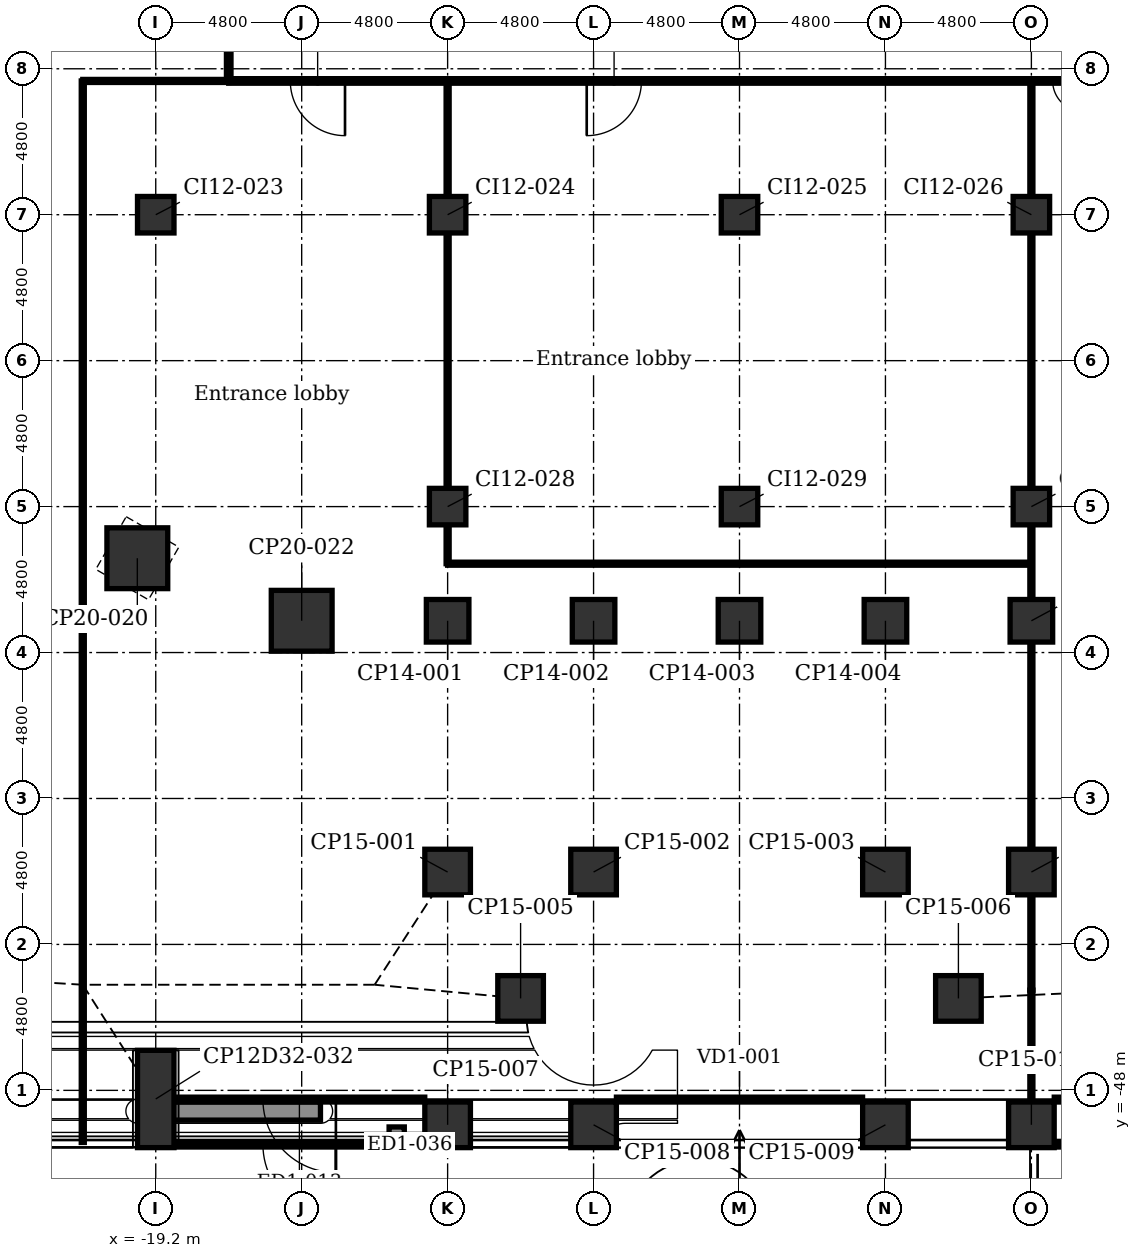
"""IFC4 building model, lengths in metres.
Left out: names, types, materials, properties, quantities, classifications, styles, units other than length and angle.
Written with IfcOpenShell. Run it as: python <this file> out.ifc"""

import sys

from ifc_helpers import new_model, si_unit, direction, frame, frame_2d, origin, origin_2d, place, context, subcontext, project, spatial, rectangle, extrude, element, fill, save


model = new_model("IFC4")
c1 = context("Model", 3, precision=1e-05, world=origin(), true_north=direction((0.0, 1.0)))
c2 = subcontext(c1, "Body", "Model", "MODEL_VIEW")
j1 = project(units=[si_unit("LENGTHUNIT", "METRE"), si_unit("PLANEANGLEUNIT", "RADIAN")], contexts=[c1])
p1 = place(None, origin())
s1 = spatial("IfcSite", under=j1, at=p1, CompositionType="ELEMENT")
p2 = place(p1, origin())
s2 = spatial("IfcBuilding", under=s1, at=p2, CompositionType="ELEMENT")
p3 = place(p2, origin())
s3 = spatial("IfcBuildingStorey", under=s2, at=p3, CompositionType="ELEMENT", Elevation=0.0)
for number, where, z_axis, x_axis in (
    (1, (9.6, -49.133, -0.4), (0.0, 0.0, 1.0), (1.0, 0.0, 0.0)),
    (2, (4.8, -49.133, -0.4), (0.0, 0.0, 1.0), (1.0, 0.0, 0.0)),
    (3, (-4.8, -49.133, -0.4), (0.0, 0.0, 1.0), (1.0, 0.0, 0.0)),
    (4, (-9.6, -49.133, -0.4), (0.0, 0.0, 1.0), (1.0, 0.0, 0.0)),
):
    element("IfcColumn", number, at=place(p3, frame(where, z_axis=z_axis, x_axis=x_axis)), inside=s3, PredefinedType="COLUMN", context=c2, shape_type="SweptSolid", body=[
        extrude(rectangle(XDim=1.5, YDim=1.5, at=origin_2d()), origin(), (0.0, 0.0, 1.0), 7.1),
    ])
p4 = place(p3, frame((-19.2, -48.283, -0.4), z_axis=(0.0, 0.0, 1.0), x_axis=(1.0, 0.0, 0.0)))
e5 = element("IfcColumn", 5, at=p4, inside=s3, PredefinedType="COLUMN", context=c2, shape_type="SweptSolid", body=[
    extrude(rectangle(XDim=1.2, YDim=3.2, at=origin_2d()), origin(), (0.0, 0.0, 1.0), 7.1),
])
for number, where, z_axis, x_axis in (
    (6, (7.2, -44.976, -0.4), (0.0, 0.0, 1.0), (1.0, 0.0, 0.0)),
    (7, (-7.2, -44.976, -0.4), (0.0, 0.0, 1.0), (1.0, 0.0, 0.0)),
    (8, (9.6, -40.819, -0.4), (0.0, 0.0, 1.0), (1.0, 0.0, 0.0)),
    (9, (4.8, -40.819, -0.4), (0.0, 0.0, 1.0), (1.0, 0.0, 0.0)),
    (10, (-4.8, -40.819, -0.4), (0.0, 0.0, 1.0), (1.0, 0.0, 0.0)),
    (11, (-9.6, -40.819, -0.4), (0.0, 0.0, 1.0), (1.0, 0.0, 0.0)),
):
    element("IfcColumn", number, at=place(p3, frame(where, z_axis=z_axis, x_axis=x_axis)), inside=s3, PredefinedType="COLUMN", context=c2, shape_type="SweptSolid", body=[
        extrude(rectangle(XDim=1.5, YDim=1.5, at=origin_2d()), origin(), (0.0, 0.0, 1.0), 7.1),
    ])
for number, where, z_axis, x_axis in (
    (12, (-14.4, -32.555, -0.4), (0.0, 0.0, 1.0), (1.0, 0.0, 0.0)),
    (13, (-19.806, -30.498, -0.4), (0.0, 0.0, 1.0), (0.5, 0.866, 0.0)),
):
    element("IfcColumn", number, at=place(p3, frame(where, z_axis=z_axis, x_axis=x_axis)), inside=s3, PredefinedType="COLUMN", context=c2, shape_type="SweptSolid", body=[
        extrude(rectangle(XDim=2.0, YDim=2.0, at=origin_2d()), origin(), (0.0, 0.0, 1.0), 7.1),
    ])
for number, where, z_axis, x_axis in (
    (14, (9.6, -32.555, -0.4), (0.0, 0.0, 1.0), (1.0, 0.0, 0.0)),
    (15, (4.8, -32.555, -0.4), (0.0, 0.0, 1.0), (1.0, 0.0, 0.0)),
    (16, (0.0, -32.555, -0.4), (0.0, 0.0, 1.0), (1.0, 0.0, 0.0)),
    (17, (-4.8, -32.555, -0.4), (0.0, 0.0, 1.0), (1.0, 0.0, 0.0)),
    (18, (-9.6, -32.555, -0.4), (0.0, 0.0, 1.0), (1.0, 0.0, 0.0)),
):
    element("IfcColumn", number, at=place(p3, frame(where, z_axis=z_axis, x_axis=x_axis)), inside=s3, PredefinedType="COLUMN", context=c2, shape_type="SweptSolid", body=[
        extrude(rectangle(XDim=1.4, YDim=1.4, at=origin_2d()), origin(), (0.0, 0.0, 1.0), 7.1),
    ])
for number, where, z_axis, x_axis in (
    (19, (-19.2, -19.2, -0.4), (0.0, 0.0, 1.0), (1.0, 0.0, 0.0)),
    (20, (-9.6, -28.8, -0.4), (0.0, 0.0, 1.0), (1.0, 0.0, 0.0)),
    (21, (-9.6, -19.2, -0.4), (0.0, 0.0, 1.0), (1.0, 0.0, 0.0)),
    (22, (0.0, -28.8, -0.4), (0.0, 0.0, 1.0), (1.0, 0.0, 0.0)),
    (23, (0.0, -19.2, -0.4), (0.0, 0.0, 1.0), (1.0, 0.0, 0.0)),
    (24, (9.6, -28.8, -0.4), (0.0, 0.0, 1.0), (1.0, 0.0, 0.0)),
    (25, (9.6, -19.2, -0.4), (0.0, 0.0, 1.0), (1.0, 0.0, 0.0)),
):
    element("IfcColumn", number, at=place(p3, frame(where, z_axis=z_axis, x_axis=x_axis)), inside=s3, PredefinedType="COLUMN", context=c2, shape_type="SweptSolid", body=[
        extrude(rectangle(XDim=1.2, YDim=1.2, at=origin_2d()), origin(), (0.0, 0.0, 1.0), 7.1),
    ])
p5 = place(p3, frame((18.598, -48.303, 0.0), z_axis=(0.0, 0.0, 1.0), x_axis=(-1.0, 0.0, 0.0)))
e26 = element("IfcWall", 26, at=p5, inside=s3, PredefinedType="PARTITIONING", context=c2, shape_type="SweptSolid", body=[
    extrude(rectangle(XDim=8.246, YDim=0.16, at=frame_2d((4.123, 0.0))), origin(), (0.0, 0.0, 1.0), 6.7),
])
p6 = place(p5, frame((2.923, 0.0, 0.0)))
e27 = element("IfcOpeningElement", 27, at=p6, cuts=e26, PredefinedType="OPENING", context=c2, shape_type="SweptSolid", body=[
    extrude(rectangle(XDim=2.4, YDim=2.4, at=frame_2d((1.2, 1.2))), frame((0.0, 0.09, 0.0), z_axis=(0.0, -1.0, 0.0), x_axis=(1.0, 0.0, 0.0)), (0.0, 0.0, 1.0), 0.18),
])
p7 = place(p3, frame((4.048, -48.303, 0.0), z_axis=(0.0, 0.0, 1.0), x_axis=(-1.0, 0.0, 0.0)))
e28 = element("IfcWall", 28, at=p7, inside=s3, PredefinedType="PARTITIONING", context=c2, shape_type="SweptSolid", body=[
    extrude(rectangle(XDim=8.096, YDim=0.16, at=frame_2d((4.048, 0.0))), origin(), (0.0, 0.0, 1.0), 6.7),
])
p8 = place(p7, frame((1.298, 0.0, 0.0)))
e29 = element("IfcOpeningElement", 29, at=p8, cuts=e28, PredefinedType="OPENING", context=c2, shape_type="SweptSolid", body=[
    extrude(rectangle(XDim=5.5, YDim=4.5, at=frame_2d((2.75, 2.25))), frame((0.0, 0.09, 0.0), z_axis=(0.0, -1.0, 0.0), x_axis=(1.0, 0.0, 0.0)), (0.0, 0.0, 1.0), 0.18),
])
p9 = place(p3, frame((-10.352, -48.303, 0.0), z_axis=(0.0, 0.0, 1.0), x_axis=(-1.0, 0.0, 0.0)))
e30 = element("IfcWall", 30, at=p9, inside=s3, PredefinedType="PARTITIONING", context=c2, shape_type="SweptSolid", body=[
    extrude(rectangle(XDim=8.246, YDim=0.16, at=frame_2d((4.123, 0.0))), origin(), (0.0, 0.0, 1.0), 6.7),
])
p10 = place(p9, frame((2.923, 0.0, 0.0)))
e31 = element("IfcOpeningElement", 31, at=p10, cuts=e30, PredefinedType="OPENING", context=c2, shape_type="SweptSolid", body=[
    extrude(rectangle(XDim=2.4, YDim=2.4, at=frame_2d((1.2, 1.2))), frame((0.0, 0.09, 0.0), z_axis=(0.0, -1.0, 0.0), x_axis=(1.0, 0.0, 0.0)), (0.0, 0.0, 1.0), 0.18),
])
p11 = place(p3, frame((18.596, -49.783, 0.0), z_axis=(0.0, 0.0, 1.0), x_axis=(-1.0, 0.0, 0.0)))
e32 = element("IfcWall", 32, at=p11, inside=s3, PredefinedType="PARTITIONING", context=c2, shape_type="SweptSolid", body=[
    extrude(rectangle(XDim=8.242, YDim=0.16, at=frame_2d((4.121, 0.0))), origin(), (0.0, 0.0, 1.0), 6.7),
])
p12 = place(p11, frame((2.921, 0.0, 0.0)))
e33 = element("IfcOpeningElement", 33, at=p12, cuts=e32, PredefinedType="OPENING", context=c2, shape_type="SweptSolid", body=[
    extrude(rectangle(XDim=2.4, YDim=2.4, at=frame_2d((1.2, 1.2))), frame((0.0, 0.09, 0.0), z_axis=(0.0, -1.0, 0.0), x_axis=(1.0, 0.0, 0.0)), (0.0, 0.0, 1.0), 0.18),
])
p13 = place(p3, frame((-10.354, -49.783, 0.0), z_axis=(0.0, 0.0, 1.0), x_axis=(-1.0, 0.0, 0.0)))
e34 = element("IfcWall", 34, at=p13, inside=s3, PredefinedType="PARTITIONING", context=c2, shape_type="SweptSolid", body=[
    extrude(rectangle(XDim=8.242, YDim=0.16, at=frame_2d((4.121, 0.0))), origin(), (0.0, 0.0, 1.0), 6.7),
])
p14 = place(p13, frame((2.921, 0.0, 0.0)))
e35 = element("IfcOpeningElement", 35, at=p14, cuts=e34, PredefinedType="OPENING", context=c2, shape_type="SweptSolid", body=[
    extrude(rectangle(XDim=2.4, YDim=2.4, at=frame_2d((1.2, 1.2))), frame((0.0, 0.09, 0.0), z_axis=(0.0, -1.0, 0.0), x_axis=(1.0, 0.0, 0.0)), (0.0, 0.0, 1.0), 0.18),
])
p15 = place(p3, frame((-13.782, -48.683, 7.0), z_axis=(0.0, 0.0, 1.0), x_axis=(-1.0, 0.0, 0.0)))
e36 = element("IfcWall", 36, at=p15, inside=s3, PredefinedType="USERDEFINED", context=c2, shape_type="SweptSolid", body=[
    extrude(rectangle(XDim=6.0, YDim=0.6, at=frame_2d((3.0, 0.0))), origin(), (0.0, 0.0, 1.0), 0.7),
])
p16 = place(p3, frame((-11.025, -49.453, 0.0), z_axis=(0.0, 0.0, 1.0), x_axis=(-1.0, 0.0, 0.0)))
e37 = element("IfcWall", 37, at=p16, inside=s3, PredefinedType="SOLIDWALL", context=c2, shape_type="SweptSolid", body=[
    extrude(rectangle(XDim=0.5, YDim=0.5, at=frame_2d((0.25, 0.0))), origin(), (0.0, 0.0, 1.0), 6.4),
])
p17 = place(p3, frame((9.6, -28.24, 0.0), z_axis=(0.0, 0.0, 1.0), x_axis=(0.0, 1.0, 0.0)))
e38 = element("IfcWall", 38, at=p17, inside=s3, PredefinedType="PARTITIONING", context=c2, shape_type="SweptSolid", body=[
    extrude(rectangle(XDim=8.48, YDim=0.1, at=frame_2d((4.24, 0.0))), origin(), (0.0, 0.0, 1.0), 6.293),
])
p18 = place(p3, frame((9.6, -49.713, 0.0), z_axis=(0.0, 0.0, 1.0), x_axis=(0.0, 1.0, 0.0)))
e39 = element("IfcWall", 39, at=p18, inside=s3, PredefinedType="PARTITIONING", context=c2, shape_type="SweptSolid", body=[
    extrude(rectangle(XDim=5.01, YDim=0.1, at=frame_2d((2.505, 0.0))), origin(), (0.0, 0.0, 1.0), 6.7),
])
p19 = place(p3, frame((9.6, -44.703, 0.0), z_axis=(0.0, 0.0, 1.0), x_axis=(0.0, 1.0, 0.0)))
e40 = element("IfcWall", 40, at=p19, inside=s3, PredefinedType="PARTITIONING", context=c2, shape_type="SweptSolid", body=[
    extrude(rectangle(XDim=3.174, YDim=0.1, at=frame_2d((1.587, 0.0))), origin(), (0.0, 0.0, 1.0), 6.39),
])
p20 = place(p3, frame((9.6, -41.529, 0.0), z_axis=(0.0, 0.0, 1.0), x_axis=(0.0, 1.0, 0.0)))
e41 = element("IfcWall", 41, at=p20, inside=s3, PredefinedType="PARTITIONING", context=c2, shape_type="SweptSolid", body=[
    extrude(rectangle(XDim=1.42, YDim=0.1, at=frame_2d((0.71, 0.0))), origin(), (0.0, 0.0, 1.0), 6.7),
])
p21 = place(p3, frame((9.6, -40.109, 0.0), z_axis=(0.0, 0.0, 1.0), x_axis=(0.0, 1.0, 0.0)))
e42 = element("IfcWall", 42, at=p21, inside=s3, PredefinedType="PARTITIONING", context=c2, shape_type="SweptSolid", body=[
    extrude(rectangle(XDim=6.894, YDim=0.1, at=frame_2d((3.447, 0.0))), origin(), (0.0, 0.0, 1.0), 6.39),
])
p22 = place(p3, frame((9.6, -33.215, 0.0), z_axis=(0.0, 0.0, 1.0), x_axis=(0.0, 1.0, 0.0)))
e43 = element("IfcWall", 43, at=p22, inside=s3, PredefinedType="PARTITIONING", context=c2, shape_type="SweptSolid", body=[
    extrude(rectangle(XDim=1.32, YDim=0.1, at=frame_2d((0.66, 0.0))), origin(), (0.0, 0.0, 1.0), 6.7),
])
p23 = place(p3, frame((9.6, -31.896, 0.0), z_axis=(0.0, 0.0, 1.0), x_axis=(0.0, 1.0, 0.0)))
e44 = element("IfcWall", 44, at=p23, inside=s3, PredefinedType="PARTITIONING", context=c2, shape_type="SweptSolid", body=[
    extrude(rectangle(XDim=2.535, YDim=0.1, at=frame_2d((1.268, 0.0))), origin(), (0.0, 0.0, 1.0), 6.39),
])
for number, where, z_axis, x_axis in (
    (45, (9.6, -29.36, 0.0), (0.0, 0.0, 1.0), (0.0, 1.0, 0.0)),
    (46, (9.6, -19.76, 0.0), (0.0, 0.0, 1.0), (0.0, 1.0, 0.0)),
):
    element("IfcWall", number, at=place(p3, frame(where, z_axis=z_axis, x_axis=x_axis)), inside=s3, PredefinedType="PARTITIONING", context=c2, shape_type="SweptSolid", body=[
        extrude(rectangle(XDim=1.12, YDim=0.1, at=frame_2d((0.56, 0.0))), origin(), (0.0, 0.0, 1.0), 6.7),
    ])
p24 = place(p3, frame((9.6, -18.64, 0.0), z_axis=(0.0, 0.0, 1.0), x_axis=(0.0, 1.0, 0.0)))
e47 = element("IfcWall", 47, at=p24, inside=s3, PredefinedType="PARTITIONING", context=c2, shape_type="SweptSolid", body=[
    extrude(rectangle(XDim=3.84, YDim=0.1, at=frame_2d((1.92, 0.0))), origin(), (0.0, 0.0, 1.0), 6.293),
])
p25 = place(p3, frame((-9.6, -28.24, 0.0), z_axis=(0.0, 0.0, 1.0), x_axis=(0.0, 1.0, 0.0)))
e48 = element("IfcWall", 48, at=p25, inside=s3, PredefinedType="PARTITIONING", context=c2, shape_type="SweptSolid", body=[
    extrude(rectangle(XDim=8.48, YDim=0.1, at=frame_2d((4.24, 0.0))), origin(), (0.0, 0.0, 1.0), 6.293),
])
p26 = place(p3, frame((-9.6, -30.678, 0.0), z_axis=(0.0, 0.0, 1.0), x_axis=(0.0, 1.0, 0.0)))
e49 = element("IfcWall", 49, at=p26, inside=s3, PredefinedType="PARTITIONING", context=c2, shape_type="SweptSolid", body=[
    extrude(rectangle(XDim=1.318, YDim=0.1, at=frame_2d((0.659, 0.0))), origin(), (0.0, 0.0, 1.0), 6.39),
])
for number, where, z_axis, x_axis in (
    (50, (-9.6, -29.36, 0.0), (0.0, 0.0, 1.0), (0.0, 1.0, 0.0)),
    (51, (-9.6, -19.76, 0.0), (0.0, 0.0, 1.0), (0.0, 1.0, 0.0)),
):
    element("IfcWall", number, at=place(p3, frame(where, z_axis=z_axis, x_axis=x_axis)), inside=s3, PredefinedType="PARTITIONING", context=c2, shape_type="SweptSolid", body=[
        extrude(rectangle(XDim=1.12, YDim=0.1, at=frame_2d((0.56, 0.0))), origin(), (0.0, 0.0, 1.0), 6.7),
    ])
p27 = place(p3, frame((-9.6, -18.64, 0.0), z_axis=(0.0, 0.0, 1.0), x_axis=(0.0, 1.0, 0.0)))
e52 = element("IfcWall", 52, at=p27, inside=s3, PredefinedType="PARTITIONING", context=c2, shape_type="SweptSolid", body=[
    extrude(rectangle(XDim=3.84, YDim=0.1, at=frame_2d((1.92, 0.0))), origin(), (0.0, 0.0, 1.0), 6.293),
])
p28 = place(p3, frame((-16.8, -14.8, 0.0), z_axis=(0.0, 0.0, 1.0), x_axis=(0.0, 1.0, 0.0)))
e53 = element("IfcWall", 53, at=p28, inside=s3, PredefinedType="PARTITIONING", context=c2, shape_type="SweptSolid", body=[
    extrude(rectangle(XDim=10.85, YDim=0.15, at=frame_2d((5.425, 0.0))), origin(), (0.0, 0.0, 1.0), 6.7),
])
p29 = place(p28, frame((2.235, 0.0, 0.0)))
e54 = element("IfcOpeningElement", 54, at=p29, cuts=e53, PredefinedType="OPENING", context=c2, shape_type="SweptSolid", body=[
    extrude(rectangle(XDim=1.8, YDim=2.1, at=frame_2d((0.9, 1.05))), frame((0.0, 0.085, 0.0), z_axis=(0.0, -1.0, 0.0), x_axis=(1.0, 0.0, 0.0)), (0.0, 0.0, 1.0), 0.17),
])
p30 = place(p28, frame((8.6, 0.0, 0.0)))
e55 = element("IfcOpeningElement", 55, at=p30, cuts=e53, PredefinedType="OPENING", context=c2, shape_type="SweptSolid", body=[
    extrude(rectangle(XDim=1.0, YDim=2.1, at=frame_2d((0.5, 1.05))), frame((0.0, 0.085, 0.0), z_axis=(0.0, -1.0, 0.0), x_axis=(1.0, 0.0, 0.0)), (0.0, 0.0, 1.0), 0.17),
])
p31 = place(p3, frame((-21.6, -49.713, 0.0), z_axis=(0.0, 0.0, 1.0), x_axis=(0.0, 1.0, 0.0)))
e56 = element("IfcWall", 56, at=p31, inside=s3, PredefinedType="PARTITIONING", context=c2, shape_type="SweptSolid", body=[
    extrude(rectangle(XDim=34.913, YDim=0.1, at=frame_2d((17.457, 0.0))), origin(), (0.0, 0.0, 1.0), 6.7),
])
p32 = place(p3, frame((-9.6, -30.678, 0.0), z_axis=(0.0, 0.0, 1.0), x_axis=(1.0, 0.0, 0.0)))
e57 = element("IfcWall", 57, at=p32, inside=s3, PredefinedType="PARTITIONING", context=c2, shape_type="SweptSolid", body=[
    extrude(rectangle(XDim=19.2, YDim=0.1, at=frame_2d((9.6, 0.0))), origin(), (0.0, 0.0, 1.0), 6.7),
])
p33 = place(p3, frame((-21.6, -14.8, 0.0), z_axis=(0.0, 0.0, 1.0), x_axis=(1.0, 0.0, 0.0)))
e58 = element("IfcWall", 58, at=p33, inside=s3, PredefinedType="PARTITIONING", context=c2, shape_type="SweptSolid", body=[
    extrude(rectangle(XDim=4.8, YDim=0.1, at=frame_2d((2.4, 0.0))), origin(), (0.0, 0.0, 1.0), 6.7),
])
p34 = place(p3, frame((-16.8, -14.8, 0.0), z_axis=(0.0, 0.0, 1.0), x_axis=(1.0, 0.0, 0.0)))
e59 = element("IfcWall", 59, at=p34, inside=s3, PredefinedType="PARTITIONING", context=c2, shape_type="SweptSolid", body=[
    extrude(rectangle(XDim=33.6, YDim=0.15, at=frame_2d((16.8, 0.0))), origin(), (0.0, 0.0, 1.0), 6.7),
])
p35 = place(p34, frame((30.15, 0.0, 0.0)))
e60 = element("IfcOpeningElement", 60, at=p35, cuts=e59, PredefinedType="OPENING", context=c2, shape_type="SweptSolid", body=[
    extrude(rectangle(XDim=0.9, YDim=2.1, at=frame_2d((0.45, 1.05))), frame((0.0, 0.085, 0.0), z_axis=(0.0, -1.0, 0.0), x_axis=(1.0, 0.0, 0.0)), (0.0, 0.0, 1.0), 0.17),
])
p36 = place(p34, frame((32.55, 0.0, 0.0)))
e61 = element("IfcOpeningElement", 61, at=p36, cuts=e59, PredefinedType="OPENING", context=c2, shape_type="SweptSolid", body=[
    extrude(rectangle(XDim=0.9, YDim=2.1, at=frame_2d((0.45, 1.05))), frame((0.0, 0.085, 0.0), z_axis=(0.0, -1.0, 0.0), x_axis=(1.0, 0.0, 0.0)), (0.0, 0.0, 1.0), 0.17),
])
p37 = place(p34, frame((2.025, 0.0, 0.0)))
e62 = element("IfcOpeningElement", 62, at=p37, cuts=e59, PredefinedType="OPENING", context=c2, shape_type="SweptSolid", body=[
    extrude(rectangle(XDim=1.8, YDim=2.1, at=frame_2d((0.9, 1.05))), frame((0.0, 0.085, 0.0), z_axis=(0.0, -1.0, 0.0), x_axis=(1.0, 0.0, 0.0)), (0.0, 0.0, 1.0), 0.17),
])
p38 = place(p34, frame((11.775, 0.0, 0.0)))
e63 = element("IfcOpeningElement", 63, at=p38, cuts=e59, PredefinedType="OPENING", context=c2, shape_type="SweptSolid", body=[
    extrude(rectangle(XDim=1.8, YDim=2.1, at=frame_2d((0.9, 1.05))), frame((0.0, 0.085, 0.0), z_axis=(0.0, -1.0, 0.0), x_axis=(1.0, 0.0, 0.0)), (0.0, 0.0, 1.0), 0.17),
])
p39 = place(p34, frame((27.1, 0.0, 0.0)))
e64 = element("IfcOpeningElement", 64, at=p39, cuts=e59, PredefinedType="OPENING", context=c2, shape_type="SweptSolid", body=[
    extrude(rectangle(XDim=1.0, YDim=2.1, at=frame_2d((0.5, 1.05))), frame((0.0, 0.085, 0.0), z_axis=(0.0, -1.0, 0.0), x_axis=(1.0, 0.0, 0.0)), (0.0, 0.0, 1.0), 0.17),
])
p40 = place(p8, origin())
e65 = element("IfcDoor", 65, at=p40, inside=s3, OperationType="ROLLINGUP", PredefinedType="GATE", context=c2, shape_type="SweptSolid", body=[
    extrude(rectangle(XDim=5.5, YDim=4.5, at=frame_2d((2.75, 2.25))), frame((0.0, 0.025, 0.0), z_axis=(0.0, -1.0, 0.0), x_axis=(1.0, 0.0, 0.0)), (0.0, 0.0, 1.0), 0.05),
])
fill(e29, e65)
p41 = place(p10, origin())
e66 = element("IfcDoor", 66, at=p41, inside=s3, OperationType="DOUBLE_DOOR_DOUBLE_SWING", PredefinedType="DOOR", context=c2, shape_type="SweptSolid", body=[
    extrude(rectangle(XDim=2.4, YDim=2.4, at=frame_2d((1.2, 1.2))), frame((0.0, 0.025, 0.0), z_axis=(0.0, -1.0, 0.0), x_axis=(1.0, 0.0, 0.0)), (0.0, 0.0, 1.0), 0.05),
])
fill(e31, e66)
p42 = place(p14, origin())
e67 = element("IfcDoor", 67, at=p42, inside=s3, OperationType="DOUBLE_DOOR_DOUBLE_SWING", PredefinedType="DOOR", context=c2, shape_type="SweptSolid", body=[
    extrude(rectangle(XDim=2.4, YDim=2.4, at=frame_2d((1.2, 1.2))), frame((0.0, 0.025, 0.0), z_axis=(0.0, -1.0, 0.0), x_axis=(1.0, 0.0, 0.0)), (0.0, 0.0, 1.0), 0.05),
])
fill(e35, e67)
p43 = place(p37, frame((1.8, 0.0, 0.0), z_axis=(0.0, 0.0, 1.0), x_axis=(-1.0, 0.0, 0.0)))
e68 = element("IfcDoor", 68, at=p43, inside=s3, OperationType="SINGLE_SWING_RIGHT", PredefinedType="DOOR", context=c2, shape_type="SweptSolid", body=[
    extrude(rectangle(XDim=1.8, YDim=2.1, at=frame_2d((0.9, 1.05))), frame((0.0, 0.025, 0.0), z_axis=(0.0, -1.0, 0.0), x_axis=(1.0, 0.0, 0.0)), (0.0, 0.0, 1.0), 0.05),
])
fill(e62, e68)
p44 = place(p38, frame((1.8, 0.0, 0.0), z_axis=(0.0, 0.0, 1.0), x_axis=(-1.0, 0.0, 0.0)))
e69 = element("IfcDoor", 69, at=p44, inside=s3, OperationType="SINGLE_SWING_LEFT", PredefinedType="DOOR", context=c2, shape_type="SweptSolid", body=[
    extrude(rectangle(XDim=1.8, YDim=2.1, at=frame_2d((0.9, 1.05))), frame((0.0, 0.025, 0.0), z_axis=(0.0, -1.0, 0.0), x_axis=(1.0, 0.0, 0.0)), (0.0, 0.0, 1.0), 0.05),
])
fill(e63, e69)
p45 = place(p39, frame((1.0, 0.0, 0.0), z_axis=(0.0, 0.0, 1.0), x_axis=(-1.0, 0.0, 0.0)))
e70 = element("IfcDoor", 70, at=p45, inside=s3, OperationType="SINGLE_SWING_RIGHT", PredefinedType="DOOR", context=c2, shape_type="SweptSolid", body=[
    extrude(rectangle(XDim=1.0, YDim=2.1, at=frame_2d((0.5, 1.05))), frame((0.0, 0.025, 0.0), z_axis=(0.0, -1.0, 0.0), x_axis=(1.0, 0.0, 0.0)), (0.0, 0.0, 1.0), 0.05),
])
fill(e64, e70)
save(model, sys.argv[1])
